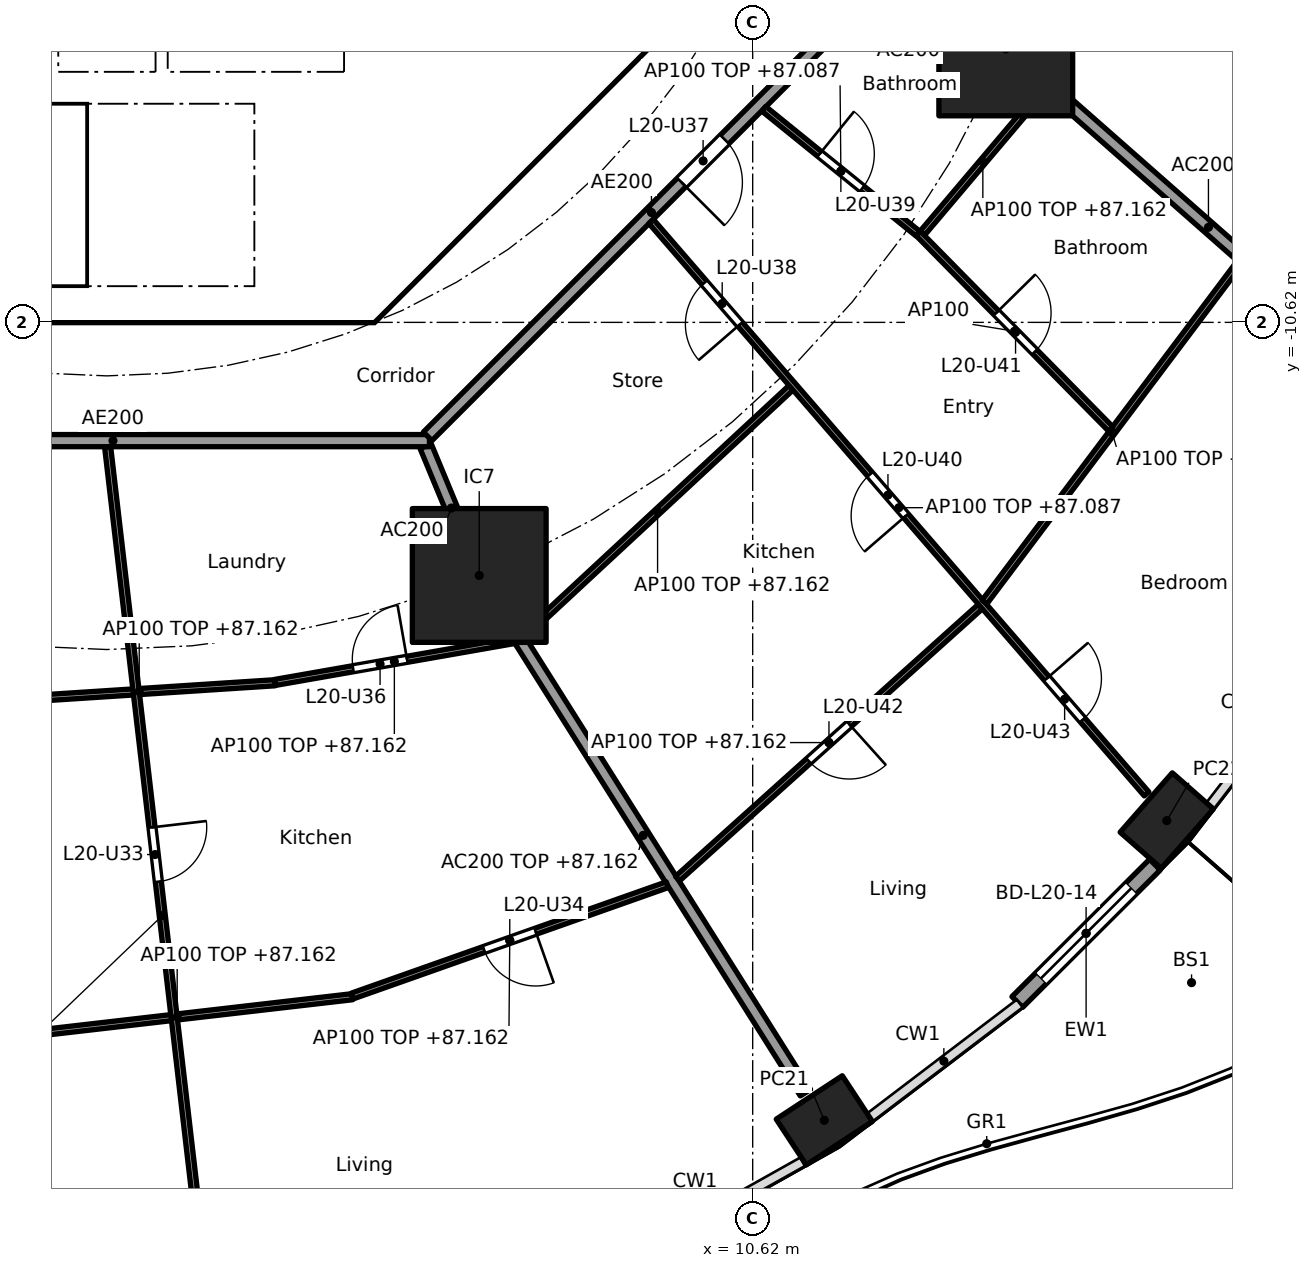
"""IFC4 building model, lengths in metres.
Left out: names, types, materials, properties, quantities, classifications, styles, units other than length and angle.
Written with IfcOpenShell. Run it as: python <this file> out.ifc"""

import sys

from ifc_helpers import new_model, si_unit, direction, frame, frame_2d, origin, origin_2d, place, context, subcontext, project, spatial, polyline, rectangle, hollow_rectangle, outline, extrude, element, fill, save


model = new_model("IFC4")
c1 = context("Model", 3, precision=1e-05, world=origin(), true_north=direction((0.0, 1.0)))
c2 = subcontext(c1, "Body", "Model", "MODEL_VIEW")
j1 = project(units=[si_unit("LENGTHUNIT", "METRE"), si_unit("PLANEANGLEUNIT", "RADIAN")], contexts=[c1])
p1 = place(None, origin())
s1 = spatial("IfcSite", under=j1, at=p1, CompositionType="ELEMENT")
p2 = place(p1, origin())
s2 = spatial("IfcBuilding", under=s1, at=p2, CompositionType="ELEMENT")
p3 = place(p2, frame((0.0, 0.0, 84.4)))
s3 = spatial("IfcBuildingStorey", under=s2, at=p3, CompositionType="ELEMENT", Elevation=84.4)
for number, where, z_axis, x_axis in (
    (1, (11.798, -23.742, 0.0), (0.0, 0.0, 1.0), (0.836, 0.549, 0.0)),
    (2, (17.43, -18.813, 0.0), (0.0, 0.0, 1.0), (0.66, 0.751, 0.0)),
):
    element("IfcColumn", number, at=place(p3, frame(where, z_axis=z_axis, x_axis=x_axis)), inside=s3, PredefinedType="COLUMN", context=c2, shape_type="SweptSolid", body=[
        extrude(hollow_rectangle(XDim=1.3, YDim=0.9, WallThickness=0.045, at=origin_2d()), origin(), (0.0, 0.0, 1.0), 3.7),
    ])
for number, where, z_axis, x_axis in (
    (3, (6.123, -14.782, 0.0), (0.0, 0.0, 1.0), (1.0, 0.0, 0.0)),
    (4, (14.782, -6.123, 0.0), (0.0, 0.0, 1.0), (1.0, 0.0, 0.0)),
):
    element("IfcColumn", number, at=place(p3, frame(where, z_axis=z_axis, x_axis=x_axis)), inside=s3, PredefinedType="COLUMN", context=c2, shape_type="SweptSolid", body=[
        extrude(rectangle(XDim=2.2, YDim=2.2, at=origin_2d()), origin(), (0.0, 0.0, 1.0), 3.7),
    ])
p4 = place(p3, frame((17.235, -19.537, 0.0), z_axis=(0.0, 0.0, 1.0), x_axis=(-0.707793551437, -0.706419343269, 0.0)))
e5 = element("IfcWall", 5, at=p4, inside=s3, PredefinedType="SOLIDWALL", context=c2, shape_type="SweptSolid", body=[
    extrude(rectangle(XDim=3.198, YDim=0.25, at=frame_2d((1.599, 0.0))), origin(), (0.0, 0.0, 1.0), 3.44),
])
p5 = place(p4, frame((0.549, 0.0, 0.0)))
e6 = element("IfcOpeningElement", 6, at=p5, cuts=e5, PredefinedType="OPENING", context=c2, shape_type="SweptSolid", body=[
    extrude(rectangle(XDim=2.1, YDim=2.4, at=frame_2d((1.05, 1.2))), frame((0.0, 0.135, 0.0), z_axis=(0.0, -1.0, 0.0), x_axis=(1.0, 0.0, 0.0)), (0.0, 0.0, 1.0), 0.27),
])
p6 = place(p3, frame((4.613, -9.988, 0.0), z_axis=(0.0, 0.0, 1.0), x_axis=(0.707106781187, 0.707106781187, 0.0)))
e7 = element("IfcWall", 7, at=p6, inside=s3, PredefinedType="SHEAR", context=c2, shape_type="SweptSolid", body=[
    extrude(rectangle(XDim=7.602, YDim=0.6, at=frame_2d((3.801, 0.0))), origin(), (0.0, 0.0, 1.0), 3.44),
])
p7 = place(p6, frame((3.201, 0.0, 0.0)))
e8 = element("IfcOpeningElement", 8, at=p7, cuts=e7, PredefinedType="OPENING", context=c2, shape_type="SweptSolid", body=[
    extrude(rectangle(XDim=1.2, YDim=2.1, at=frame_2d((0.6, 1.05))), frame((0.0, 0.31, 0.0), z_axis=(0.0, -1.0, 0.0), x_axis=(1.0, 0.0, 0.0)), (0.0, 0.0, 1.0), 0.62),
])
p8 = place(p3, frame((4.0, -10.025, 0.0), z_axis=(0.0, 0.0, 1.0), x_axis=(0.0, 1.0, 0.0)))
e9 = element("IfcWall", 9, at=p8, inside=s3, PredefinedType="SOLIDWALL", context=c2, shape_type="SweptSolid", body=[
    extrude(rectangle(XDim=3.0, YDim=0.2, at=frame_2d((1.5, 0.0))), origin(), (0.0, 0.0, 1.0), 3.44),
])
p9 = place(p8, frame((0.975, 0.0, 0.0)))
e10 = element("IfcOpeningElement", 10, at=p9, cuts=e9, PredefinedType="OPENING", context=c2, shape_type="SweptSolid", body=[
    extrude(rectangle(XDim=1.1, YDim=2.1, at=frame_2d((0.55, 1.05))), frame((0.0, 0.11, 0.0), z_axis=(0.0, -1.0, 0.0), x_axis=(1.0, 0.0, 0.0)), (0.0, 0.0, 1.0), 0.22),
])
p10 = place(p3, frame((4.0, -6.5, 0.0), z_axis=(0.0, 0.0, 1.0), x_axis=(0.0, 1.0, 0.0)))
e11 = element("IfcWall", 11, at=p10, inside=s3, PredefinedType="SOLIDWALL", context=c2, shape_type="SweptSolid", body=[
    extrude(rectangle(XDim=2.2, YDim=0.2, at=frame_2d((1.1, 0.0))), origin(), (0.0, 0.0, 1.0), 3.44),
])
p11 = place(p10, frame((0.55, 0.0, 0.0)))
e12 = element("IfcOpeningElement", 12, at=p11, cuts=e11, PredefinedType="OPENING", context=c2, shape_type="SweptSolid", body=[
    extrude(rectangle(XDim=1.1, YDim=2.1, at=frame_2d((0.55, 1.05))), frame((0.0, 0.11, 0.0), z_axis=(0.0, -1.0, 0.0), x_axis=(1.0, 0.0, 0.0)), (0.0, 0.0, 1.0), 0.22),
])
p12 = place(p3, origin())
e13 = element("IfcWall", 13, at=p12, inside=s3, PredefinedType="SHEAR", context=c2, shape_type="SweptSolid", body=[
    extrude(outline(polyline([(-4.152, -10.025), (4.152, -10.025), (4.401, -9.776), (4.825, -10.2), (4.401, -10.625), (-4.401, -10.625), (-4.825, -10.2), (-4.401, -9.776), (-4.152, -10.025)])), origin(), (0.0, 0.0, 1.0), 3.44),
])
for number, where, z_axis, x_axis in (
    (14, (-0.9, -6.5, 0.0), (0.0, 0.0, 1.0), (0.0, 1.0, 0.0)),
    (15, (0.9, -6.5, 0.0), (0.0, 0.0, 1.0), (0.0, 1.0, 0.0)),
):
    element("IfcWall", number, at=place(p3, frame(where, z_axis=z_axis, x_axis=x_axis)), inside=s3, PredefinedType="SOLIDWALL", context=c2, shape_type="SweptSolid", body=[
        extrude(rectangle(XDim=2.2, YDim=0.2, at=frame_2d((1.1, 0.0))), origin(), (0.0, 0.0, 1.0), 3.44),
    ])
p13 = place(p3, origin())
e16 = element("IfcWall", 16, at=p13, inside=s3, PredefinedType="SOLIDWALL", context=c2, shape_type="SweptSolid", body=[
    extrude(outline(polyline([(4.1, -7.025), (-4.1, -7.025), (-4.1, -6.5), (4.1, -6.5), (4.1, -7.025)])), origin(), (0.0, 0.0, 1.0), 3.44),
])
p14 = place(p3, frame((5.243, -12.657, 0.0), z_axis=(0.0, 0.0, 1.0), x_axis=(0.382747093259, -0.923853160736, 0.0)))
e17 = element("IfcWall", 17, at=p14, inside=s3, PredefinedType="PARTITIONING", context=c2, shape_type="SweptSolid", body=[
    extrude(rectangle(XDim=2.2, YDim=0.2, at=frame_2d((1.1, 0.0))), origin(), (0.0, 0.0, 1.0), 3.44),
])
p15 = place(p3, frame((6.15, -14.824, 0.0), z_axis=(0.0, 0.0, 1.0), x_axis=(0.533492589682, -0.845804739142, 0.0)))
e18 = element("IfcWall", 18, at=p15, inside=s3, PredefinedType="PARTITIONING", context=c2, shape_type="SweptSolid", body=[
    extrude(rectangle(XDim=10.006, YDim=0.2, at=frame_2d((5.003, 0.0))), origin(), (0.0, 0.0, 1.0), 2.762),
])
p16 = place(p3, frame((14.82, -6.156, 0.0), z_axis=(0.0, 0.0, 1.0), x_axis=(0.750582231659, -0.660777052808, 0.0)))
e19 = element("IfcWall", 19, at=p16, inside=s3, PredefinedType="PARTITIONING", context=c2, shape_type="SweptSolid", body=[
    extrude(rectangle(XDim=8.781, YDim=0.2, at=frame_2d((4.391, 0.0))), origin(), (0.0, 0.0, 1.0), 2.762),
])
p17 = place(p3, frame((-5.104, -12.565, 0.0), z_axis=(0.0, 0.0, 1.0), x_axis=(1.0, 0.0, 0.0)))
e20 = element("IfcWall", 20, at=p17, inside=s3, PredefinedType="PARTITIONING", context=c2, shape_type="SweptSolid", body=[
    extrude(rectangle(XDim=10.409, YDim=0.2, at=frame_2d((5.205, 0.0))), origin(), (0.0, 0.0, 1.0), 3.44),
])
p18 = place(p3, frame((5.275, -12.494, 0.0), z_axis=(0.0, 0.0, 1.0), x_axis=(0.707106781187, 0.707106781187, 0.0)))
e21 = element("IfcWall", 21, at=p18, inside=s3, PredefinedType="PARTITIONING", context=c2, shape_type="SweptSolid", body=[
    extrude(rectangle(XDim=10.409, YDim=0.2, at=frame_2d((5.205, 0.0))), origin(), (0.0, 0.0, 1.0), 3.44),
])
p19 = place(p18, frame((5.906, 0.0, 0.0)))
e22 = element("IfcOpeningElement", 22, at=p19, cuts=e21, PredefinedType="OPENING", context=c2, shape_type="SweptSolid", body=[
    extrude(rectangle(XDim=1.0, YDim=2.1, at=frame_2d((0.5, 1.05))), frame((0.0, 0.11, 0.0), z_axis=(0.0, -1.0, 0.0), x_axis=(1.0, 0.0, 0.0)), (0.0, 0.0, 1.0), 0.22),
])
p20 = place(p3, frame((-1.703, -16.836, 0.0), z_axis=(0.0, 0.0, 1.0), x_axis=(0.997899919101, 0.064774620473, 0.0)))
e23 = element("IfcWall", 23, at=p20, inside=s3, PredefinedType="PARTITIONING", context=c2, shape_type="SweptSolid", body=[
    extrude(rectangle(XDim=4.478, YDim=0.1, at=frame_2d((2.239, 0.0))), origin(), (0.0, 0.0, 1.0), 2.762),
])
p21 = place(p3, frame((-1.726, -22.375, 0.0), z_axis=(0.0, 0.0, 1.0), x_axis=(0.993392336919, 0.114767874207, 0.0)))
e24 = element("IfcWall", 24, at=p21, inside=s3, PredefinedType="PARTITIONING", context=c2, shape_type="SweptSolid", body=[
    extrude(rectangle(XDim=5.801, YDim=0.1, at=frame_2d((2.9, 0.0))), origin(), (0.0, 0.0, 1.0), 2.762),
])
p22 = place(p3, frame((0.011, -12.664, 0.0), z_axis=(0.0, 0.0, 1.0), x_axis=(0.115841404661, -0.993267722704, 0.0)))
e25 = element("IfcWall", 25, at=p22, inside=s3, PredefinedType="PARTITIONING", context=c2, shape_type="SweptSolid", body=[
    extrude(rectangle(XDim=15.528, YDim=0.1, at=frame_2d((7.764, 0.0))), origin(), (0.0, 0.0, 1.0), 2.687),
])
p23 = place(p22, frame((6.303, 0.0, 0.0)))
e26 = element("IfcOpeningElement", 26, at=p23, cuts=e25, PredefinedType="OPENING", context=c2, shape_type="SweptSolid", body=[
    extrude(rectangle(XDim=0.9, YDim=2.1, at=frame_2d((0.45, 1.05))), frame((0.0, 0.06, 0.0), z_axis=(0.0, -1.0, 0.0), x_axis=(1.0, 0.0, 0.0)), (0.0, 0.0, 1.0), 0.12),
])
p24 = place(p3, frame((2.765, -16.541, 0.0), z_axis=(0.0, 0.0, 1.0), x_axis=(0.984998714702, 0.172561676036, 0.0)))
e27 = element("IfcWall", 27, at=p24, inside=s3, PredefinedType="PARTITIONING", context=c2, shape_type="SweptSolid", body=[
    extrude(rectangle(XDim=3.984, YDim=0.1, at=frame_2d((1.992, 0.0))), origin(), (0.0, 0.0, 1.0), 2.762),
])
p25 = place(p24, frame((1.304, 0.0, 0.0)))
e28 = element("IfcOpeningElement", 28, at=p25, cuts=e27, PredefinedType="OPENING", context=c2, shape_type="SweptSolid", body=[
    extrude(rectangle(XDim=0.9, YDim=2.1, at=frame_2d((0.45, 1.05))), frame((0.0, 0.06, 0.0), z_axis=(0.0, -1.0, 0.0), x_axis=(1.0, 0.0, 0.0)), (0.0, 0.0, 1.0), 0.12),
])
p26 = place(p3, frame((4.034, -21.698, 0.0), z_axis=(0.0, 0.0, 1.0), x_axis=(0.942861482644, 0.33318497047, 0.0)))
e29 = element("IfcWall", 29, at=p26, inside=s3, PredefinedType="PARTITIONING", context=c2, shape_type="SweptSolid", body=[
    extrude(rectangle(XDim=5.495, YDim=0.1, at=frame_2d((2.748, 0.0))), origin(), (0.0, 0.0, 1.0), 2.762),
])
p27 = place(p26, frame((2.297, 0.0, 0.0)))
e30 = element("IfcOpeningElement", 30, at=p27, cuts=e29, PredefinedType="OPENING", context=c2, shape_type="SweptSolid", body=[
    extrude(rectangle(XDim=0.9, YDim=2.1, at=frame_2d((0.45, 1.05))), frame((0.0, 0.06, 0.0), z_axis=(0.0, -1.0, 0.0), x_axis=(1.0, 0.0, 0.0)), (0.0, 0.0, 1.0), 0.12),
])
p28 = place(p3, frame((6.861, -15.768, 0.0), z_axis=(0.0, 0.0, 1.0), x_axis=(0.733011256509, 0.680216508056, 0.0)))
e31 = element("IfcWall", 31, at=p28, inside=s3, PredefinedType="PARTITIONING", context=c2, shape_type="SweptSolid", body=[
    extrude(rectangle(XDim=5.989, YDim=0.1, at=frame_2d((2.994, 0.0))), origin(), (0.0, 0.0, 1.0), 2.762),
])
p29 = place(p3, frame((9.384, -19.768, 0.0), z_axis=(0.0, 0.0, 1.0), x_axis=(0.74387407395, 0.668319805262, 0.0)))
e32 = element("IfcWall", 32, at=p29, inside=s3, PredefinedType="PARTITIONING", context=c2, shape_type="SweptSolid", body=[
    extrude(rectangle(XDim=6.695, YDim=0.1, at=frame_2d((3.348, 0.0))), origin(), (0.0, 0.0, 1.0), 2.762),
])
p30 = place(p29, frame((2.898, 0.0, 0.0)))
e33 = element("IfcOpeningElement", 33, at=p30, cuts=e32, PredefinedType="OPENING", context=c2, shape_type="SweptSolid", body=[
    extrude(rectangle(XDim=0.9, YDim=2.1, at=frame_2d((0.45, 1.05))), frame((0.0, 0.06, 0.0), z_axis=(0.0, -1.0, 0.0), x_axis=(1.0, 0.0, 0.0)), (0.0, 0.0, 1.0), 0.12),
])
p31 = place(p3, frame((8.95, -8.96, 0.0), z_axis=(0.0, 0.0, 1.0), x_axis=(0.65441081073, -0.756139200676, 0.0)))
e34 = element("IfcWall", 34, at=p31, inside=s3, PredefinedType="PARTITIONING", context=c2, shape_type="SweptSolid", body=[
    extrude(rectangle(XDim=12.451, YDim=0.1, at=frame_2d((6.226, 0.0))), origin(), (0.0, 0.0, 1.0), 2.687),
])
p32 = place(p31, frame((1.336, 0.0, 0.0)))
e35 = element("IfcOpeningElement", 35, at=p32, cuts=e34, PredefinedType="OPENING", context=c2, shape_type="SweptSolid", body=[
    extrude(rectangle(XDim=0.9, YDim=2.1, at=frame_2d((0.45, 1.05))), frame((0.0, 0.06, 0.0), z_axis=(0.0, -1.0, 0.0), x_axis=(1.0, 0.0, 0.0)), (0.0, 0.0, 1.0), 0.12),
])
p33 = place(p31, frame((5.501, 0.0, 0.0)))
e36 = element("IfcOpeningElement", 36, at=p33, cuts=e34, PredefinedType="OPENING", context=c2, shape_type="SweptSolid", body=[
    extrude(rectangle(XDim=0.9, YDim=2.1, at=frame_2d((0.45, 1.05))), frame((0.0, 0.06, 0.0), z_axis=(0.0, -1.0, 0.0), x_axis=(1.0, 0.0, 0.0)), (0.0, 0.0, 1.0), 0.12),
])
p34 = place(p31, frame((9.941, 0.0, 0.0)))
e37 = element("IfcOpeningElement", 37, at=p34, cuts=e34, PredefinedType="OPENING", context=c2, shape_type="SweptSolid", body=[
    extrude(rectangle(XDim=0.9, YDim=2.1, at=frame_2d((0.45, 1.05))), frame((0.0, 0.06, 0.0), z_axis=(0.0, -1.0, 0.0), x_axis=(1.0, 0.0, 0.0)), (0.0, 0.0, 1.0), 0.12),
])
p35 = place(p3, frame((14.432, -15.219, 0.0), z_axis=(0.0, 0.0, 1.0), x_axis=(0.601001256685, 0.799248077548, 0.0)))
e38 = element("IfcWall", 38, at=p35, inside=s3, PredefinedType="PARTITIONING", context=c2, shape_type="SweptSolid", body=[
    extrude(rectangle(XDim=6.98, YDim=0.1, at=frame_2d((3.49, 0.0))), origin(), (0.0, 0.0, 1.0), 2.762),
])
p36 = place(p3, frame((10.802, -7.107, 0.0), z_axis=(0.0, 0.0, 1.0), x_axis=(0.776992142502, -0.62951029419, 0.0)))
e39 = element("IfcWall", 39, at=p36, inside=s3, PredefinedType="PARTITIONING", context=c2, shape_type="SweptSolid", body=[
    extrude(rectangle(XDim=3.263, YDim=0.1, at=frame_2d((1.631, 0.0))), origin(), (0.0, 0.0, 1.0), 2.687),
])
p37 = place(p36, frame((1.181, 0.0, 0.0)))
e40 = element("IfcOpeningElement", 40, at=p37, cuts=e39, PredefinedType="OPENING", context=c2, shape_type="SweptSolid", body=[
    extrude(rectangle(XDim=0.9, YDim=2.1, at=frame_2d((0.45, 1.05))), frame((0.0, 0.06, 0.0), z_axis=(0.0, -1.0, 0.0), x_axis=(1.0, 0.0, 0.0)), (0.0, 0.0, 1.0), 0.12),
])
p38 = place(p3, frame((13.341, -9.157, 0.0), z_axis=(0.0, 0.0, 1.0), x_axis=(0.701624526877, -0.712546856904, 0.0)))
e41 = element("IfcWall", 41, at=p38, inside=s3, PredefinedType="PARTITIONING", context=c2, shape_type="SweptSolid", body=[
    extrude(rectangle(XDim=4.515, YDim=0.1, at=frame_2d((2.258, 0.0))), origin(), (0.0, 0.0, 1.0), 3.44),
])
p39 = place(p38, frame((1.833, 0.0, 0.0)))
e42 = element("IfcOpeningElement", 42, at=p39, cuts=e41, PredefinedType="OPENING", context=c2, shape_type="SweptSolid", body=[
    extrude(rectangle(XDim=0.9, YDim=2.1, at=frame_2d((0.45, 1.05))), frame((0.0, 0.06, 0.0), z_axis=(0.0, -1.0, 0.0), x_axis=(1.0, 0.0, 0.0)), (0.0, 0.0, 1.0), 0.12),
])
p40 = place(p3, frame((13.409, -9.155, 0.0), z_axis=(0.0, 0.0, 1.0), x_axis=(0.646130325831, 0.763227097293, 0.0)))
e43 = element("IfcWall", 43, at=p40, inside=s3, PredefinedType="PARTITIONING", context=c2, shape_type="SweptSolid", body=[
    extrude(rectangle(XDim=3.084, YDim=0.1, at=frame_2d((1.542, 0.0))), origin(), (0.0, 0.0, 1.0), 2.762),
])
p41 = place(p3, frame((15.477, -6.625, 0.0), z_axis=(0.0, 0.0, 1.0), x_axis=(0.107561928907, 0.994198386365, 0.0)))
e44 = element("IfcWall", 44, at=p41, inside=s3, PredefinedType="PARTITIONING", context=c2, shape_type="SweptSolid", body=[
    extrude(rectangle(XDim=4.072, YDim=0.1, at=frame_2d((2.036, 0.0))), origin(), (0.0, 0.0, 1.0), 2.762),
])
p42 = place(p5, origin())
e45 = element("IfcDoor", 45, at=p42, inside=s3, OperationType="SLIDING_TO_LEFT", PredefinedType="DOOR", context=c2, shape_type="SweptSolid", body=[
    extrude(rectangle(XDim=2.1, YDim=2.4, at=frame_2d((1.05, 1.2))), frame((0.0, 0.025, 0.0), z_axis=(0.0, -1.0, 0.0), x_axis=(1.0, 0.0, 0.0)), (0.0, 0.0, 1.0), 0.05),
])
fill(e6, e45)
p43 = place(p9, origin())
e46 = element("IfcDoor", 46, at=p43, inside=s3, OperationType="SINGLE_SWING_LEFT", PredefinedType="DOOR", context=c2, shape_type="SweptSolid", body=[
    extrude(rectangle(XDim=1.1, YDim=2.1, at=frame_2d((0.55, 1.05))), frame((0.0, 0.025, 0.0), z_axis=(0.0, -1.0, 0.0), x_axis=(1.0, 0.0, 0.0)), (0.0, 0.0, 1.0), 0.05),
])
fill(e10, e46)
p44 = place(p7, origin())
e47 = element("IfcDoor", 47, at=p44, inside=s3, OperationType="SINGLE_SWING_LEFT", PredefinedType="DOOR", context=c2, shape_type="SweptSolid", body=[
    extrude(rectangle(XDim=1.2, YDim=2.1, at=frame_2d((0.6, 1.05))), frame((0.0, 0.025, 0.0), z_axis=(0.0, -1.0, 0.0), x_axis=(1.0, 0.0, 0.0)), (0.0, 0.0, 1.0), 0.05),
])
fill(e8, e47)
p45 = place(p23, origin())
e48 = element("IfcDoor", 48, at=p45, inside=s3, OperationType="SINGLE_SWING_LEFT", PredefinedType="DOOR", context=c2, shape_type="SweptSolid", body=[
    extrude(rectangle(XDim=0.9, YDim=2.1, at=frame_2d((0.45, 1.05))), frame((0.0, 0.025, 0.0), z_axis=(0.0, -1.0, 0.0), x_axis=(1.0, 0.0, 0.0)), (0.0, 0.0, 1.0), 0.05),
])
fill(e26, e48)
p46 = place(p27, frame((0.9, 0.0, 0.0), x_axis=(-1.0, 0.0, 0.0)))
e49 = element("IfcDoor", 49, at=p46, inside=s3, OperationType="SINGLE_SWING_LEFT", PredefinedType="DOOR", context=c2, shape_type="SweptSolid", body=[
    extrude(rectangle(XDim=0.9, YDim=2.1, at=frame_2d((0.45, 1.05))), frame((0.0, 0.025, 0.0), z_axis=(0.0, -1.0, 0.0), x_axis=(1.0, 0.0, 0.0)), (0.0, 0.0, 1.0), 0.05),
])
fill(e30, e49)
p47 = place(p25, origin())
e50 = element("IfcDoor", 50, at=p47, inside=s3, OperationType="SINGLE_SWING_RIGHT", PredefinedType="DOOR", context=c2, shape_type="SweptSolid", body=[
    extrude(rectangle(XDim=0.9, YDim=2.1, at=frame_2d((0.45, 1.05))), frame((0.0, 0.025, 0.0), z_axis=(0.0, -1.0, 0.0), x_axis=(1.0, 0.0, 0.0)), (0.0, 0.0, 1.0), 0.05),
])
fill(e28, e50)
p48 = place(p19, frame((1.0, 0.0, 0.0), x_axis=(-1.0, 0.0, 0.0)))
e51 = element("IfcDoor", 51, at=p48, inside=s3, OperationType="SINGLE_SWING_RIGHT", PredefinedType="DOOR", context=c2, shape_type="SweptSolid", body=[
    extrude(rectangle(XDim=1.0, YDim=2.1, at=frame_2d((0.5, 1.05))), frame((0.0, 0.025, 0.0), z_axis=(0.0, -1.0, 0.0), x_axis=(1.0, 0.0, 0.0)), (0.0, 0.0, 1.0), 0.05),
])
fill(e22, e51)
p49 = place(p32, frame((0.9, 0.0, 0.0), x_axis=(-1.0, 0.0, 0.0)))
e52 = element("IfcDoor", 52, at=p49, inside=s3, OperationType="SINGLE_SWING_LEFT", PredefinedType="DOOR", context=c2, shape_type="SweptSolid", body=[
    extrude(rectangle(XDim=0.9, YDim=2.1, at=frame_2d((0.45, 1.05))), frame((0.0, 0.025, 0.0), z_axis=(0.0, -1.0, 0.0), x_axis=(1.0, 0.0, 0.0)), (0.0, 0.0, 1.0), 0.05),
])
fill(e35, e52)
p50 = place(p37, origin())
e53 = element("IfcDoor", 53, at=p50, inside=s3, OperationType="SINGLE_SWING_LEFT", PredefinedType="DOOR", context=c2, shape_type="SweptSolid", body=[
    extrude(rectangle(XDim=0.9, YDim=2.1, at=frame_2d((0.45, 1.05))), frame((0.0, 0.025, 0.0), z_axis=(0.0, -1.0, 0.0), x_axis=(1.0, 0.0, 0.0)), (0.0, 0.0, 1.0), 0.05),
])
fill(e40, e53)
p51 = place(p33, frame((0.9, 0.0, 0.0), x_axis=(-1.0, 0.0, 0.0)))
e54 = element("IfcDoor", 54, at=p51, inside=s3, OperationType="SINGLE_SWING_LEFT", PredefinedType="DOOR", context=c2, shape_type="SweptSolid", body=[
    extrude(rectangle(XDim=0.9, YDim=2.1, at=frame_2d((0.45, 1.05))), frame((0.0, 0.025, 0.0), z_axis=(0.0, -1.0, 0.0), x_axis=(1.0, 0.0, 0.0)), (0.0, 0.0, 1.0), 0.05),
])
fill(e36, e54)
p52 = place(p39, origin())
e55 = element("IfcDoor", 55, at=p52, inside=s3, OperationType="SINGLE_SWING_LEFT", PredefinedType="DOOR", context=c2, shape_type="SweptSolid", body=[
    extrude(rectangle(XDim=0.9, YDim=2.1, at=frame_2d((0.45, 1.05))), frame((0.0, 0.025, 0.0), z_axis=(0.0, -1.0, 0.0), x_axis=(1.0, 0.0, 0.0)), (0.0, 0.0, 1.0), 0.05),
])
fill(e42, e55)
p53 = place(p30, frame((0.9, 0.0, 0.0), x_axis=(-1.0, 0.0, 0.0)))
e56 = element("IfcDoor", 56, at=p53, inside=s3, OperationType="SINGLE_SWING_LEFT", PredefinedType="DOOR", context=c2, shape_type="SweptSolid", body=[
    extrude(rectangle(XDim=0.9, YDim=2.1, at=frame_2d((0.45, 1.05))), frame((0.0, 0.025, 0.0), z_axis=(0.0, -1.0, 0.0), x_axis=(1.0, 0.0, 0.0)), (0.0, 0.0, 1.0), 0.05),
])
fill(e33, e56)
p54 = place(p34, origin())
e57 = element("IfcDoor", 57, at=p54, inside=s3, OperationType="SINGLE_SWING_LEFT", PredefinedType="DOOR", context=c2, shape_type="SweptSolid", body=[
    extrude(rectangle(XDim=0.9, YDim=2.1, at=frame_2d((0.45, 1.05))), frame((0.0, 0.025, 0.0), z_axis=(0.0, -1.0, 0.0), x_axis=(1.0, 0.0, 0.0)), (0.0, 0.0, 1.0), 0.05),
])
fill(e37, e57)
save(model, sys.argv[1])
